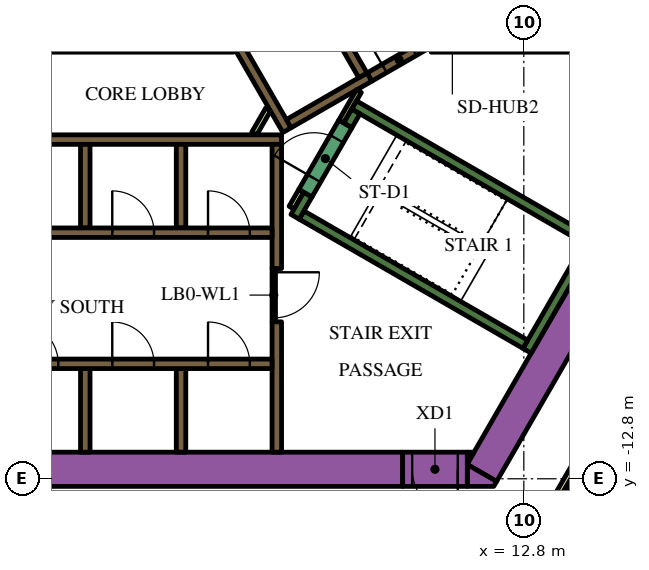
"""IFC4 building model, lengths in metres.
Left out: names, types, materials, properties, quantities, classifications, styles, units other than length and angle.
Written with IfcOpenShell. Run it as: python <this file> out.ifc"""

import sys

from ifc_helpers import new_model, si_unit, direction, frame, frame_2d, origin, place, context, subcontext, project, spatial, polyline, rectangle, outline, extrude, element, fill, save


model = new_model("IFC4")
c1 = context("Model", 3, precision=1e-05, world=origin(), true_north=direction((0.0, 1.0)))
c2 = subcontext(c1, "Body", "Model", "MODEL_VIEW")
j1 = project(units=[si_unit("LENGTHUNIT", "METRE"), si_unit("PLANEANGLEUNIT", "RADIAN")], contexts=[c1])
p1 = place(None, origin())
s1 = spatial("IfcSite", under=j1, at=p1, CompositionType="ELEMENT")
p2 = place(p1, origin())
s2 = spatial("IfcBuilding", under=s1, at=p2, CompositionType="ELEMENT")
p3 = place(p2, frame((0.0, 0.0, 27.6)))
s3 = spatial("IfcBuildingStorey", under=s2, at=p3, CompositionType="ELEMENT", Elevation=27.6)
p4 = place(p3, frame((6.776, 13.364, 0.0), z_axis=(0.0, 0.0, 1.0), x_axis=(0.500004177138, -0.8660229921, 0.0)))
e1 = element("IfcWall", 1, at=p4, inside=s3, PredefinedType="SOLIDWALL", context=c2, shape_type="SweptSolid", body=[
    extrude(rectangle(XDim=20.204, YDim=0.9, at=frame_2d((10.102, 0.0))), origin(), (0.0, 0.0, 1.0), 3.9),
])
p5 = place(p3, frame((11.695, -12.644, 0.0), z_axis=(0.0, 0.0, 1.0), x_axis=(0.500010229568, 0.86601949766, 0.0)))
e2 = element("IfcWall", 2, at=p5, inside=s3, PredefinedType="SOLIDWALL", context=c2, shape_type="SweptSolid", body=[
    extrude(rectangle(XDim=9.326, YDim=0.9, at=frame_2d((4.663, 0.0))), origin(), (0.0, 0.0, 1.0), 3.9),
])
p6 = place(p3, origin())
e3 = element("IfcWall", 3, at=p6, inside=s3, PredefinedType="SOLIDWALL", context=c2, shape_type="SweptSolid", body=[
    extrude(outline(polyline([(12.009, -13.0), (11.312, -13.0), (11.312, -12.425), (12.083, -12.871), (12.009, -13.0)])), origin(), (0.0, 0.0, 1.0), 3.9),
])
e4 = element("IfcWall", 4, at=p6, inside=s3, PredefinedType="SOLIDWALL", context=c2, shape_type="SweptSolid", body=[
    extrude(outline(polyline([(11.489, -12.1), (11.312, -12.407), (11.312, -12.1), (11.489, -12.1)])), origin(), (0.0, 0.0, 1.0), 3.9),
])
p7 = place(p3, frame((-12.019, -12.55, 0.0), z_axis=(0.0, 0.0, 1.0), x_axis=(1.0, 0.0, 0.0)))
e5 = element("IfcWall", 5, at=p7, inside=s3, PredefinedType="SOLIDWALL", context=c2, shape_type="SweptSolid", body=[
    extrude(rectangle(XDim=21.63, YDim=0.9, at=frame_2d((10.815, 0.0))), origin(), (0.0, 0.0, 1.0), 3.9),
])
p8 = place(p3, frame((12.885, -9.431, 0.0), z_axis=(0.0, 0.0, 1.0), x_axis=(0.500020560727, 0.866013532718, 0.0)))
e6 = element("IfcWall", 6, at=p8, inside=s3, PredefinedType="SOLIDWALL", context=c2, shape_type="SweptSolid", body=[
    extrude(rectangle(XDim=3.45, YDim=0.25, at=frame_2d((1.725, 0.0))), origin(), (0.0, 0.0, 1.0), 3.9),
])
p9 = place(p3, frame((12.84, -9.261, 0.0), z_axis=(0.0, 0.0, 1.0), x_axis=(-0.866013990052, 0.500019768644, 0.0)))
e7 = element("IfcWall", 7, at=p9, inside=s3, PredefinedType="SOLIDWALL", context=c2, shape_type="SweptSolid", body=[
    extrude(rectangle(XDim=6.8, YDim=0.25, at=frame_2d((3.4, 0.0))), origin(), (0.0, 0.0, 1.0), 3.9),
])
p10 = place(p3, frame((6.78, -5.906, 0.0), z_axis=(0.0, 0.0, 1.0), x_axis=(0.500223362819, 0.865896406789, 0.0)))
e8 = element("IfcWall", 8, at=p10, inside=s3, PredefinedType="SOLIDWALL", context=c2, shape_type="SweptSolid", body=[
    extrude(rectangle(XDim=0.675, YDim=0.25, at=frame_2d((0.337, 0.0))), origin(), (0.0, 0.0, 1.0), 3.9),
])
p11 = place(p3, frame((8.334, -2.964, 0.0), z_axis=(0.0, 0.0, 1.0), x_axis=(0.866016039709, -0.500016218704, 0.0)))
e9 = element("IfcWall", 9, at=p11, inside=s3, PredefinedType="SOLIDWALL", context=c2, shape_type="SweptSolid", body=[
    extrude(rectangle(XDim=7.05, YDim=0.25, at=frame_2d((3.525, 0.0))), origin(), (0.0, 0.0, 1.0), 3.9),
])
p12 = place(p3, frame((8.168, -3.503, 0.0), z_axis=(0.0, 0.0, 1.0), x_axis=(0.49972245349, 0.866185586049, 0.0)))
e10 = element("IfcWall", 10, at=p12, inside=s3, PredefinedType="SOLIDWALL", context=c2, shape_type="SweptSolid", body=[
    extrude(rectangle(XDim=0.425, YDim=0.25, at=frame_2d((0.212, 0.0))), origin(), (0.0, 0.0, 1.0), 3.9),
])
p13 = place(p3, frame((-5.545, -3.875, 0.0), z_axis=(0.0, 0.0, 1.0), x_axis=(1.0, 0.0, 0.0)))
e11 = element("IfcWall", 11, at=p13, inside=s3, PredefinedType="SOLIDWALL", context=c2, shape_type="SweptSolid", body=[
    extrude(rectangle(XDim=11.97, YDim=0.25, at=frame_2d((5.985, 0.0))), origin(), (0.0, 0.0, 1.0), 3.9),
])
p14 = place(p3, frame((6.3, -8.67, 0.0), z_axis=(0.0, 0.0, 1.0), x_axis=(0.0, -1.0, 0.0)))
e12 = element("IfcWall", 12, at=p14, inside=s3, PredefinedType="SOLIDWALL", context=c2, shape_type="SweptSolid", body=[
    extrude(rectangle(XDim=3.43, YDim=0.25, at=frame_2d((1.715, 0.0))), origin(), (0.0, 0.0, 1.0), 3.9),
])
p15 = place(p3, frame((6.3, -7.268, 0.0), z_axis=(0.0, 0.0, 1.0), x_axis=(0.0, 1.0, 0.0)))
e13 = element("IfcWall", 13, at=p15, inside=s3, PredefinedType="SOLIDWALL", context=c2, shape_type="SweptSolid", body=[
    extrude(rectangle(XDim=3.268, YDim=0.25, at=frame_2d((1.634, 0.0))), origin(), (0.0, 0.0, 1.0), 3.9),
])
for number, where, z_axis, x_axis in (
    (14, (3.78, -4.0, 0.0), (0.0, 0.0, 1.0), (0.0, -1.0, 0.0)),
    (15, (1.26, -4.0, 0.0), (0.0, 0.0, 1.0), (0.0, -1.0, 0.0)),
    (16, (3.78, -12.1, 0.0), (0.0, 0.0, 1.0), (0.0, 1.0, 0.0)),
    (17, (1.26, -12.1, 0.0), (0.0, 0.0, 1.0), (0.0, 1.0, 0.0)),
):
    element("IfcWall", number, at=place(p3, frame(where, z_axis=z_axis, x_axis=x_axis)), inside=s3, PredefinedType="SOLIDWALL", context=c2, shape_type="SweptSolid", body=[
        extrude(rectangle(XDim=2.2, YDim=0.25, at=frame_2d((1.1, 0.0))), origin(), (0.0, 0.0, 1.0), 3.9),
    ])
e18 = element("IfcWall", 18, at=p6, inside=s3, PredefinedType="SOLIDWALL", context=c2, shape_type="SweptSolid", body=[
    extrude(outline(polyline([(0.566, 6.725), (0.566, 6.875), (0.566, 6.875), (0.565, 6.875), (0.361, 6.875), (0.035, 7.439), (0.252, 7.564), (0.377, 7.348), (6.552, -3.348), (6.677, -3.564), (6.46, -3.689), (0.448, 6.725), (0.565, 6.725), (0.566, 6.725), (0.566, 6.725)])), origin(), (0.0, 0.0, 1.0), 3.9),
])
p16 = place(p3, frame((6.614, -3.456, 0.0), z_axis=(0.0, 0.0, 1.0), x_axis=(0.866031582473, 0.499989298045, 0.0)))
e19 = element("IfcWall", 19, at=p16, inside=s3, PredefinedType="SOLIDWALL", context=c2, shape_type="SweptSolid", body=[
    extrude(rectangle(XDim=2.455, YDim=0.25, at=frame_2d((1.228, 0.0))), origin(), (0.0, 0.0, 1.0), 3.9),
])
p17 = place(p3, frame((6.945, -5.222, 0.0), z_axis=(0.0, 0.0, 1.0), x_axis=(-0.499818422106, -0.866130212453, 0.0)))
e20 = element("IfcWall", 20, at=p17, inside=s3, PredefinedType="PARTITIONING", context=c2, shape_type="SweptSolid", body=[
    extrude(rectangle(XDim=0.514, YDim=0.15, at=frame_2d((0.257, 0.0))), origin(), (0.0, 0.0, 1.0), 2.75),
])
p18 = place(p3, frame((5.705, -3.718, 0.0), z_axis=(0.0, 0.0, 1.0), x_axis=(0.499962090823, 0.866047289552, 0.0)))
e21 = element("IfcWall", 21, at=p18, inside=s3, PredefinedType="PARTITIONING", context=c2, shape_type="SweptSolid", body=[
    extrude(rectangle(XDim=0.735, YDim=0.15, at=frame_2d((0.367, 0.0))), origin(), (0.0, 0.0, 1.0), 2.75),
])
p19 = place(p3, frame((8.459, -2.599, 0.0), z_axis=(0.0, 0.0, 1.0), x_axis=(-0.500041054325, -0.866001699761, 0.0)))
e22 = element("IfcWall", 22, at=p19, inside=s3, PredefinedType="PARTITIONING", context=c2, shape_type="SweptSolid", body=[
    extrude(rectangle(XDim=0.929, YDim=0.15, at=frame_2d((0.464, 0.0))), origin(), (0.0, 0.0, 1.0), 3.9),
])
p20 = place(p3, frame((-6.175, -9.775, 0.0), z_axis=(0.0, 0.0, 1.0), x_axis=(1.0, 0.0, 0.0)))
e23 = element("IfcWall", 23, at=p20, inside=s3, PredefinedType="SOLIDWALL", context=c2, shape_type="SweptSolid", body=[
    extrude(rectangle(XDim=12.35, YDim=0.25, at=frame_2d((6.175, 0.0))), origin(), (0.0, 0.0, 1.0), 3.9),
])
p21 = place(p20, frame((0.585, 0.0, 0.0)))
e24 = element("IfcOpeningElement", 24, at=p21, cuts=e23, PredefinedType="OPENING", context=c2, shape_type="SweptSolid", body=[
    extrude(rectangle(XDim=1.1, YDim=2.1, at=frame_2d((0.55, 1.05))), frame((0.0, 0.135, 0.0), z_axis=(0.0, -1.0, 0.0), x_axis=(1.0, 0.0, 0.0)), (0.0, 0.0, 1.0), 0.27),
])
p22 = place(p20, frame((3.105, 0.0, 0.0)))
e25 = element("IfcOpeningElement", 25, at=p22, cuts=e23, PredefinedType="OPENING", context=c2, shape_type="SweptSolid", body=[
    extrude(rectangle(XDim=1.1, YDim=2.1, at=frame_2d((0.55, 1.05))), frame((0.0, 0.135, 0.0), z_axis=(0.0, -1.0, 0.0), x_axis=(1.0, 0.0, 0.0)), (0.0, 0.0, 1.0), 0.27),
])
p23 = place(p20, frame((5.625, 0.0, 0.0)))
e26 = element("IfcOpeningElement", 26, at=p23, cuts=e23, PredefinedType="OPENING", context=c2, shape_type="SweptSolid", body=[
    extrude(rectangle(XDim=1.1, YDim=2.1, at=frame_2d((0.55, 1.05))), frame((0.0, 0.135, 0.0), z_axis=(0.0, -1.0, 0.0), x_axis=(1.0, 0.0, 0.0)), (0.0, 0.0, 1.0), 0.27),
])
p24 = place(p20, frame((8.145, 0.0, 0.0)))
e27 = element("IfcOpeningElement", 27, at=p24, cuts=e23, PredefinedType="OPENING", context=c2, shape_type="SweptSolid", body=[
    extrude(rectangle(XDim=1.1, YDim=2.1, at=frame_2d((0.55, 1.05))), frame((0.0, 0.135, 0.0), z_axis=(0.0, -1.0, 0.0), x_axis=(1.0, 0.0, 0.0)), (0.0, 0.0, 1.0), 0.27),
])
p25 = place(p20, frame((10.665, 0.0, 0.0)))
e28 = element("IfcOpeningElement", 28, at=p25, cuts=e23, PredefinedType="OPENING", context=c2, shape_type="SweptSolid", body=[
    extrude(rectangle(XDim=1.1, YDim=2.1, at=frame_2d((0.55, 1.05))), frame((0.0, 0.135, 0.0), z_axis=(0.0, -1.0, 0.0), x_axis=(1.0, 0.0, 0.0)), (0.0, 0.0, 1.0), 0.27),
])
p26 = place(p3, frame((-6.175, -6.325, 0.0), z_axis=(0.0, 0.0, 1.0), x_axis=(1.0, 0.0, 0.0)))
e29 = element("IfcWall", 29, at=p26, inside=s3, PredefinedType="SOLIDWALL", context=c2, shape_type="SweptSolid", body=[
    extrude(rectangle(XDim=12.35, YDim=0.25, at=frame_2d((6.175, 0.0))), origin(), (0.0, 0.0, 1.0), 3.9),
])
p27 = place(p26, frame((3.205, 0.0, 0.0)))
e30 = element("IfcOpeningElement", 30, at=p27, cuts=e29, PredefinedType="OPENING", context=c2, shape_type="SweptSolid", body=[
    extrude(rectangle(XDim=0.9, YDim=2.1, at=frame_2d((0.45, 1.05))), frame((0.0, 0.135, 0.0), z_axis=(0.0, -1.0, 0.0), x_axis=(1.0, 0.0, 0.0)), (0.0, 0.0, 1.0), 0.27),
])
p28 = place(p26, frame((8.145, 0.0, 0.0)))
e31 = element("IfcOpeningElement", 31, at=p28, cuts=e29, PredefinedType="OPENING", context=c2, shape_type="SweptSolid", body=[
    extrude(rectangle(XDim=1.1, YDim=2.1, at=frame_2d((0.55, 1.05))), frame((0.0, 0.135, 0.0), z_axis=(0.0, -1.0, 0.0), x_axis=(1.0, 0.0, 0.0)), (0.0, 0.0, 1.0), 0.27),
])
p29 = place(p26, frame((10.665, 0.0, 0.0)))
e32 = element("IfcOpeningElement", 32, at=p29, cuts=e29, PredefinedType="OPENING", context=c2, shape_type="SweptSolid", body=[
    extrude(rectangle(XDim=1.1, YDim=2.1, at=frame_2d((0.55, 1.05))), frame((0.0, 0.135, 0.0), z_axis=(0.0, -1.0, 0.0), x_axis=(1.0, 0.0, 0.0)), (0.0, 0.0, 1.0), 0.27),
])
p30 = place(p3, frame((8.565, -2.185, 0.0), z_axis=(0.0, 0.0, 1.0), x_axis=(-0.499997954832, 0.866026584559, 0.0)))
e33 = element("IfcWall", 33, at=p30, inside=s3, PredefinedType="SOLIDWALL", context=c2, shape_type="SweptSolid", body=[
    extrude(rectangle(XDim=12.35, YDim=0.25, at=frame_2d((6.175, 0.0))), origin(), (0.0, 0.0, 1.0), 3.9),
])
p31 = place(p30, frame((5.725, 0.0, 0.0)))
e34 = element("IfcOpeningElement", 34, at=p31, cuts=e33, PredefinedType="OPENING", context=c2, shape_type="SweptSolid", body=[
    extrude(rectangle(XDim=0.9, YDim=2.1, at=frame_2d((0.45, 1.05))), frame((0.0, 0.135, 0.0), z_axis=(0.0, -1.0, 0.0), x_axis=(1.0, 0.0, 0.0)), (0.0, 0.0, 1.0), 0.27),
])
p32 = place(p3, frame((7.053, -5.284, 0.0), z_axis=(0.0, 0.0, 1.0), x_axis=(0.500078061341, 0.865980330357, 0.0)))
e35 = element("IfcWall", 35, at=p32, inside=s3, PredefinedType="SOLIDWALL", context=c2, shape_type="SweptSolid", body=[
    extrude(rectangle(XDim=2.1, YDim=0.4, at=frame_2d((1.05, 0.0))), origin(), (0.0, 0.0, 1.0), 3.9),
])
p33 = place(p32, frame((0.45, 0.0, 0.0)))
e36 = element("IfcOpeningElement", 36, at=p33, cuts=e35, PredefinedType="OPENING", context=c2, shape_type="SweptSolid", body=[
    extrude(rectangle(XDim=1.2, YDim=2.1, at=frame_2d((0.6, 1.05))), frame((0.0, 0.21, 0.0), z_axis=(0.0, -1.0, 0.0), x_axis=(1.0, 0.0, 0.0)), (0.0, 0.0, 1.0), 0.42),
])
p34 = place(p3, frame((8.74, -2.229, 0.0), z_axis=(0.0, 0.0, 1.0), x_axis=(0.865989075817, 0.500062916607, 0.0)))
e37 = element("IfcWall", 37, at=p34, inside=s3, PredefinedType="SOLIDWALL", context=c2, shape_type="SweptSolid", body=[
    extrude(rectangle(XDim=1.8, YDim=0.25, at=frame_2d((0.9, 0.0))), origin(), (0.0, 0.0, 1.0), 3.9),
])
p35 = place(p34, frame((0.45, 0.0, 0.0)))
e38 = element("IfcOpeningElement", 38, at=p35, cuts=e37, PredefinedType="OPENING", context=c2, shape_type="SweptSolid", body=[
    extrude(rectangle(XDim=0.9, YDim=2.1, at=frame_2d((0.45, 1.05))), frame((0.0, 0.135, 0.0), z_axis=(0.0, -1.0, 0.0), x_axis=(1.0, 0.0, 0.0)), (0.0, 0.0, 1.0), 0.27),
])
p36 = place(p3, frame((6.22, -7.266, 0.0), z_axis=(0.0, 0.0, 1.0), x_axis=(0.0, -1.0, 0.0)))
e39 = element("IfcWall", 39, at=p36, inside=s3, PredefinedType="PARTITIONING", context=c2, shape_type="SweptSolid", body=[
    extrude(rectangle(XDim=1.4, YDim=0.09, at=frame_2d((0.7, 0.0))), origin(), (0.0, 0.0, 1.0), 2.75),
])
p37 = place(p36, frame((0.1, 0.0, 0.0)))
e40 = element("IfcOpeningElement", 40, at=p37, cuts=e39, PredefinedType="OPENING", context=c2, shape_type="SweptSolid", body=[
    extrude(rectangle(XDim=1.2, YDim=2.1, at=frame_2d((0.6, 1.05))), frame((0.0, 0.055, 0.0), z_axis=(0.0, -1.0, 0.0), x_axis=(1.0, 0.0, 0.0)), (0.0, 0.0, 1.0), 0.11),
])
p38 = place(p3, frame((11.312, -12.55, 0.0), z_axis=(0.0, 0.0, 1.0), x_axis=(-1.0, 0.0, 0.0)))
e41 = element("IfcWall", 41, at=p38, inside=s3, PredefinedType="SOLIDWALL", context=c2, shape_type="SweptSolid", body=[
    extrude(rectangle(XDim=1.7, YDim=0.9, at=frame_2d((0.85, 0.0))), origin(), (0.0, 0.0, 1.0), 3.9),
])
p39 = place(p38, frame((0.25, 0.0, 0.0)))
e42 = element("IfcOpeningElement", 42, at=p39, cuts=e41, PredefinedType="OPENING", context=c2, shape_type="SweptSolid", body=[
    extrude(rectangle(XDim=1.2, YDim=2.1, at=frame_2d((0.6, 1.05))), frame((0.0, 0.46, 0.0), z_axis=(0.0, -1.0, 0.0), x_axis=(1.0, 0.0, 0.0)), (0.0, 0.0, 1.0), 0.92),
])
p40 = place(p3, frame((6.163, 18.475, 0.0), z_axis=(0.0, 0.0, 1.0), x_axis=(0.500001317485, -0.866024643133, 0.0)))
e43 = element("IfcWall", 43, at=p40, inside=s3, PredefinedType="PARTITIONING", context=c2, shape_type="SweptSolid", body=[
    extrude(rectangle(XDim=25.767, YDim=0.15, at=frame_2d((12.883, 0.0))), origin(), (0.0, 0.0, 1.0), 2.75),
])
p41 = place(p40, frame((24.586, 0.0, 0.0)))
e44 = element("IfcOpeningElement", 44, at=p41, cuts=e43, PredefinedType="OPENING", context=c2, shape_type="SweptSolid", body=[
    extrude(rectangle(XDim=1.0, YDim=2.1, at=frame_2d((0.5, 1.05))), frame((0.0, 0.085, 0.0), z_axis=(0.0, -1.0, 0.0), x_axis=(1.0, 0.0, 0.0)), (0.0, 0.0, 1.0), 0.17),
])
p42 = place(p40, frame((19.319, 0.0, 0.0)))
e45 = element("IfcOpeningElement", 45, at=p42, cuts=e43, PredefinedType="OPENING", context=c2, shape_type="SweptSolid", body=[
    extrude(rectangle(XDim=1.0, YDim=2.1, at=frame_2d((0.5, 1.05))), frame((0.0, 0.085, 0.0), z_axis=(0.0, -1.0, 0.0), x_axis=(1.0, 0.0, 0.0)), (0.0, 0.0, 1.0), 0.17),
])
p43 = place(p40, frame((18.012, 0.0, 0.0)))
e46 = element("IfcOpeningElement", 46, at=p43, cuts=e43, PredefinedType="OPENING", context=c2, shape_type="SweptSolid", body=[
    extrude(rectangle(XDim=1.0, YDim=2.1, at=frame_2d((0.5, 1.05))), frame((0.0, 0.085, 0.0), z_axis=(0.0, -1.0, 0.0), x_axis=(1.0, 0.0, 0.0)), (0.0, 0.0, 1.0), 0.17),
])
p44 = place(p40, frame((6.824, 0.0, 0.0)))
e47 = element("IfcOpeningElement", 47, at=p44, cuts=e43, PredefinedType="OPENING", context=c2, shape_type="SweptSolid", body=[
    extrude(rectangle(XDim=1.1, YDim=2.1, at=frame_2d((0.55, 1.05))), frame((0.0, 0.085, 0.0), z_axis=(0.0, -1.0, 0.0), x_axis=(1.0, 0.0, 0.0)), (0.0, 0.0, 1.0), 0.17),
])
p45 = place(p40, frame((4.658, 0.0, 0.0)))
e48 = element("IfcOpeningElement", 48, at=p45, cuts=e43, PredefinedType="OPENING", context=c2, shape_type="SweptSolid", body=[
    extrude(rectangle(XDim=0.9, YDim=2.1, at=frame_2d((0.45, 1.05))), frame((0.0, 0.085, 0.0), z_axis=(0.0, -1.0, 0.0), x_axis=(1.0, 0.0, 0.0)), (0.0, 0.0, 1.0), 0.17),
])
p46 = place(p40, frame((0.18, 0.0, 0.0)))
e49 = element("IfcOpeningElement", 49, at=p46, cuts=e43, PredefinedType="OPENING", context=c2, shape_type="SweptSolid", body=[
    extrude(rectangle(XDim=1.0, YDim=2.1, at=frame_2d((0.5, 1.05))), frame((0.0, 0.085, 0.0), z_axis=(0.0, -1.0, 0.0), x_axis=(1.0, 0.0, 0.0)), (0.0, 0.0, 1.0), 0.17),
])
p47 = place(p3, frame((15.587, -9.952, 0.0), z_axis=(0.0, 0.0, 1.0), x_axis=(-0.500016618951, -0.866015808616, 0.0)))
e50 = element("IfcWall", 50, at=p47, inside=s3, PredefinedType="PARTITIONING", context=c2, shape_type="SweptSolid", body=[
    extrude(rectangle(XDim=5.268, YDim=0.15, at=frame_2d((2.634, 0.0))), origin(), (0.0, 0.0, 1.0), 2.75),
])
p48 = place(p47, frame((0.225, 0.0, 0.0)))
e51 = element("IfcOpeningElement", 51, at=p48, cuts=e50, PredefinedType="OPENING", context=c2, shape_type="SweptSolid", body=[
    extrude(rectangle(XDim=1.0, YDim=2.1, at=frame_2d((0.5, 1.05))), frame((0.0, 0.085, 0.0), z_axis=(0.0, -1.0, 0.0), x_axis=(1.0, 0.0, 0.0)), (0.0, 0.0, 1.0), 0.17),
])
p49 = place(p3, frame((16.16, -14.31, 0.0), z_axis=(0.0, 0.0, 1.0), x_axis=(-0.866062058628, 0.499936506574, 0.0)))
e52 = element("IfcWall", 52, at=p49, inside=s3, PredefinedType="PARTITIONING", context=c2, shape_type="SweptSolid", body=[
    extrude(rectangle(XDim=2.6, YDim=0.1, at=frame_2d((1.3, 0.0))), origin(), (0.0, 0.0, 1.0), 2.75),
])
p50 = place(p49, frame((1.1, 0.0, 0.0)))
e53 = element("IfcOpeningElement", 53, at=p50, cuts=e52, PredefinedType="OPENING", context=c2, shape_type="SweptSolid", body=[
    extrude(rectangle(XDim=0.9, YDim=2.1, at=frame_2d((0.45, 1.05))), frame((0.0, 0.06, 0.0), z_axis=(0.0, -1.0, 0.0), x_axis=(1.0, 0.0, 0.0)), (0.0, 0.0, 1.0), 0.12),
])
p51 = place(p23, origin())
e54 = element("IfcDoor", 54, at=p51, inside=s3, OperationType="DOUBLE_DOOR_SLIDING", PredefinedType="DOOR", context=c2, shape_type="SweptSolid", body=[
    extrude(rectangle(XDim=1.1, YDim=2.1, at=frame_2d((0.55, 1.05))), frame((0.0, 0.025, 0.0), z_axis=(0.0, -1.0, 0.0), x_axis=(1.0, 0.0, 0.0)), (0.0, 0.0, 1.0), 0.05),
])
fill(e26, e54)
p52 = place(p24, origin())
e55 = element("IfcDoor", 55, at=p52, inside=s3, OperationType="DOUBLE_DOOR_SLIDING", PredefinedType="DOOR", context=c2, shape_type="SweptSolid", body=[
    extrude(rectangle(XDim=1.1, YDim=2.1, at=frame_2d((0.55, 1.05))), frame((0.0, 0.025, 0.0), z_axis=(0.0, -1.0, 0.0), x_axis=(1.0, 0.0, 0.0)), (0.0, 0.0, 1.0), 0.05),
])
fill(e27, e55)
p53 = place(p25, origin())
e56 = element("IfcDoor", 56, at=p53, inside=s3, OperationType="DOUBLE_DOOR_SLIDING", PredefinedType="DOOR", context=c2, shape_type="SweptSolid", body=[
    extrude(rectangle(XDim=1.1, YDim=2.1, at=frame_2d((0.55, 1.05))), frame((0.0, 0.025, 0.0), z_axis=(0.0, -1.0, 0.0), x_axis=(1.0, 0.0, 0.0)), (0.0, 0.0, 1.0), 0.05),
])
fill(e28, e56)
p54 = place(p28, origin())
e57 = element("IfcDoor", 57, at=p54, inside=s3, OperationType="DOUBLE_DOOR_SLIDING", PredefinedType="DOOR", context=c2, shape_type="SweptSolid", body=[
    extrude(rectangle(XDim=1.1, YDim=2.1, at=frame_2d((0.55, 1.05))), frame((0.0, 0.025, 0.0), z_axis=(0.0, -1.0, 0.0), x_axis=(1.0, 0.0, 0.0)), (0.0, 0.0, 1.0), 0.05),
])
fill(e31, e57)
p55 = place(p29, origin())
e58 = element("IfcDoor", 58, at=p55, inside=s3, OperationType="DOUBLE_DOOR_SLIDING", PredefinedType="DOOR", context=c2, shape_type="SweptSolid", body=[
    extrude(rectangle(XDim=1.1, YDim=2.1, at=frame_2d((0.55, 1.05))), frame((0.0, 0.025, 0.0), z_axis=(0.0, -1.0, 0.0), x_axis=(1.0, 0.0, 0.0)), (0.0, 0.0, 1.0), 0.05),
])
fill(e32, e58)
p56 = place(p33, origin())
e59 = element("IfcDoor", 59, at=p56, inside=s3, OperationType="SINGLE_SWING_LEFT", PredefinedType="DOOR", context=c2, shape_type="SweptSolid", body=[
    extrude(rectangle(XDim=1.2, YDim=2.1, at=frame_2d((0.6, 1.05))), frame((0.0, 0.025, 0.0), z_axis=(0.0, -1.0, 0.0), x_axis=(1.0, 0.0, 0.0)), (0.0, 0.0, 1.0), 0.05),
])
fill(e36, e59)
p57 = place(p35, origin())
e60 = element("IfcDoor", 60, at=p57, inside=s3, OperationType="SINGLE_SWING_LEFT", PredefinedType="DOOR", context=c2, shape_type="SweptSolid", body=[
    extrude(rectangle(XDim=0.9, YDim=2.1, at=frame_2d((0.45, 1.05))), frame((0.0, 0.025, 0.0), z_axis=(0.0, -1.0, 0.0), x_axis=(1.0, 0.0, 0.0)), (0.0, 0.0, 1.0), 0.05),
])
fill(e38, e60)
p58 = place(p37, origin())
e61 = element("IfcDoor", 61, at=p58, inside=s3, OperationType="SINGLE_SWING_LEFT", PredefinedType="DOOR", context=c2, shape_type="SweptSolid", body=[
    extrude(rectangle(XDim=1.2, YDim=2.1, at=frame_2d((0.6, 1.05))), frame((0.0, 0.025, 0.0), z_axis=(0.0, -1.0, 0.0), x_axis=(1.0, 0.0, 0.0)), (0.0, 0.0, 1.0), 0.05),
])
fill(e40, e61)
p59 = place(p39, origin())
e62 = element("IfcDoor", 62, at=p59, inside=s3, OperationType="SINGLE_SWING_LEFT", PredefinedType="DOOR", context=c2, shape_type="SweptSolid", body=[
    extrude(rectangle(XDim=1.2, YDim=2.1, at=frame_2d((0.6, 1.05))), frame((0.0, 0.025, 0.0), z_axis=(0.0, -1.0, 0.0), x_axis=(1.0, 0.0, 0.0)), (0.0, 0.0, 1.0), 0.05),
])
fill(e42, e62)
save(model, sys.argv[1])
